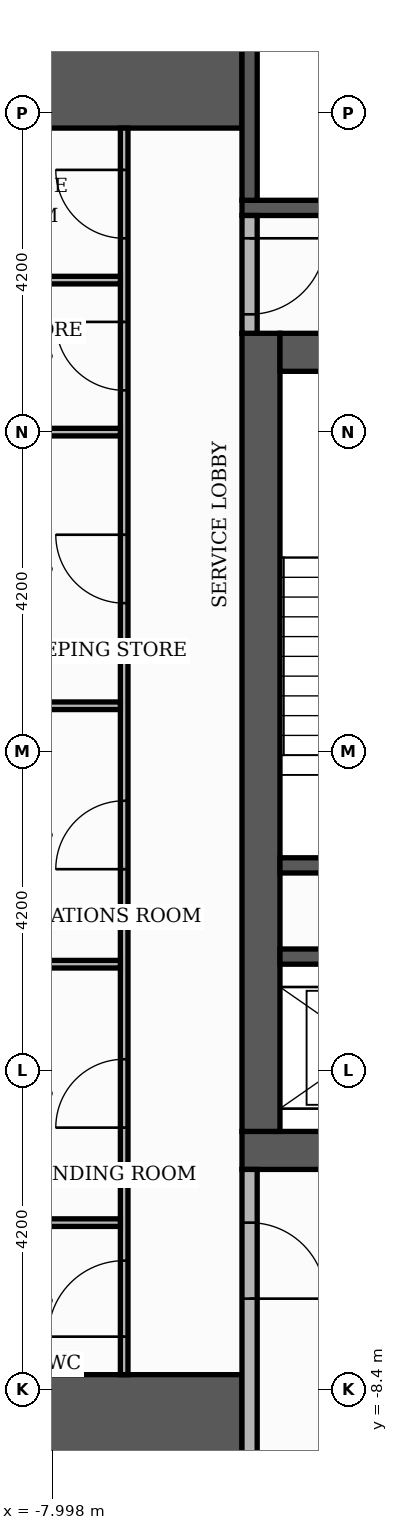
"""IFC4 building model, lengths in metres.
Left out: names, types, materials, properties, quantities, classifications, styles, units other than length and angle.
Written with IfcOpenShell. Run it as: python <this file> out.ifc"""

import sys

from ifc_helpers import new_model, si_unit, direction, frame, frame_2d, origin, place, context, subcontext, project, spatial, rectangle, extrude, element, fill, save


model = new_model("IFC4")
c1 = context("Model", 3, precision=1e-05, world=origin(), true_north=direction((0.0, 1.0)))
c2 = subcontext(c1, "Body", "Model", "MODEL_VIEW")
j1 = project(units=[si_unit("LENGTHUNIT", "METRE"), si_unit("PLANEANGLEUNIT", "RADIAN")], contexts=[c1])
p1 = place(None, origin())
s1 = spatial("IfcSite", under=j1, at=p1, CompositionType="ELEMENT")
p2 = place(p1, origin())
s2 = spatial("IfcBuilding", under=s1, at=p2, CompositionType="ELEMENT")
p3 = place(p2, frame((0.0, 0.0, 149.4)))
s3 = spatial("IfcBuildingStorey", under=s2, at=p3, CompositionType="ELEMENT", Elevation=149.4)
p4 = place(p3, frame((-5.5, -5.25, 0.0), z_axis=(0.0, 0.0, 1.0), x_axis=(1.0, 0.0, 0.0)))
e1 = element("IfcWall", 1, at=p4, inside=s3, PredefinedType="SHEAR", context=c2, shape_type="SweptSolid", body=[
    extrude(rectangle(XDim=11.0, YDim=0.5, at=frame_2d((5.5, 0.0))), origin(), (0.0, 0.0, 1.0), 3.48),
])
p5 = place(p4, frame((4.9, 0.0, 0.0)))
e2 = element("IfcOpeningElement", 2, at=p5, cuts=e1, PredefinedType="OPENING", context=c2, shape_type="SweptSolid", body=[
    extrude(rectangle(XDim=1.2, YDim=2.1, at=frame_2d((0.6, 1.05))), frame((0.0, 0.26, 0.0), z_axis=(0.0, -1.0, 0.0), x_axis=(1.0, 0.0, 0.0)), (0.0, 0.0, 1.0), 0.52),
])
p6 = place(p3, frame((-5.25, -5.0, 0.0), z_axis=(0.0, 0.0, 1.0), x_axis=(0.0, 1.0, 0.0)))
e3 = element("IfcWall", 3, at=p6, inside=s3, PredefinedType="SHEAR", context=c2, shape_type="SweptSolid", body=[
    extrude(rectangle(XDim=10.5, YDim=0.5, at=frame_2d((5.25, 0.0))), origin(), (0.0, 0.0, 1.0), 3.48),
])
p7 = place(p3, frame((-5.0, 5.25, 0.0), z_axis=(0.0, 0.0, 1.0), x_axis=(1.0, 0.0, 0.0)))
e4 = element("IfcWall", 4, at=p7, inside=s3, PredefinedType="SHEAR", context=c2, shape_type="SweptSolid", body=[
    extrude(rectangle(XDim=10.0, YDim=0.5, at=frame_2d((5.0, 0.0))), origin(), (0.0, 0.0, 1.0), 3.48),
])
p8 = place(p7, frame((4.4, 0.0, 0.0)))
e5 = element("IfcOpeningElement", 5, at=p8, cuts=e4, PredefinedType="OPENING", context=c2, shape_type="SweptSolid", body=[
    extrude(rectangle(XDim=1.2, YDim=2.1, at=frame_2d((0.6, 1.05))), frame((0.0, 0.26, 0.0), z_axis=(0.0, -1.0, 0.0), x_axis=(1.0, 0.0, 0.0)), (0.0, 0.0, 1.0), 0.52),
])
for number, where, z_axis, x_axis in (
    (6, (-10.1, -9.15, 0.0), (0.0, 0.0, 1.0), (1.0, 0.0, 0.0)),
    (7, (-10.1, 9.15, 0.0), (0.0, 0.0, 1.0), (1.0, 0.0, 0.0)),
):
    element("IfcWall", number, at=place(p3, frame(where, z_axis=z_axis, x_axis=x_axis)), inside=s3, PredefinedType="SHEAR", context=c2, shape_type="SweptSolid", body=[
        extrude(rectangle(XDim=4.6, YDim=1.9, at=frame_2d((2.3, 0.0))), origin(), (0.0, 0.0, 1.0), 3.48),
    ])
p9 = place(p3, frame((-5.0, -1.5, 0.0), z_axis=(0.0, 0.0, 1.0), x_axis=(1.0, 0.0, 0.0)))
e8 = element("IfcWall", 8, at=p9, inside=s3, PredefinedType="SHEAR", context=c2, shape_type="SweptSolid", body=[
    extrude(rectangle(XDim=3.05, YDim=0.2, at=frame_2d((1.525, 0.0))), origin(), (0.0, 0.0, 1.0), 3.48),
])
p10 = place(p3, frame((-5.5, 7.15, 0.0), z_axis=(0.0, 0.0, 1.0), x_axis=(1.0, 0.0, 0.0)))
e9 = element("IfcWall", 9, at=p10, inside=s3, PredefinedType="SHEAR", context=c2, shape_type="SweptSolid", body=[
    extrude(rectangle(XDim=6.8, YDim=0.2, at=frame_2d((3.4, 0.0))), origin(), (0.0, 0.0, 1.0), 3.48),
])
for number, where, z_axis, x_axis in (
    (10, (-5.4, 7.25, 0.0), (0.0, 0.0, 1.0), (0.0, 1.0, 0.0)),
    (11, (-5.0, -2.7, 0.0), (0.0, 0.0, 1.0), (1.0, 0.0, 0.0)),
):
    element("IfcWall", number, at=place(p3, frame(where, z_axis=z_axis, x_axis=x_axis)), inside=s3, PredefinedType="SHEAR", context=c2, shape_type="SweptSolid", body=[
        extrude(rectangle(XDim=2.85, YDim=0.2, at=frame_2d((1.425, 0.0))), origin(), (0.0, 0.0, 1.0), 3.48),
    ])
p11 = place(p3, frame((-5.4, -10.1, 0.0), z_axis=(0.0, 0.0, 1.0), x_axis=(0.0, 1.0, 0.0)))
e12 = element("IfcWall", 12, at=p11, inside=s3, PredefinedType="PARTITIONING", context=c2, shape_type="SweptSolid", body=[
    extrude(rectangle(XDim=4.6, YDim=0.2, at=frame_2d((2.3, 0.0))), origin(), (0.0, 0.0, 1.0), 3.48),
])
p12 = place(p11, frame((2.9, 0.0, 0.0)))
e13 = element("IfcOpeningElement", 13, at=p12, cuts=e12, PredefinedType="OPENING", context=c2, shape_type="SweptSolid", body=[
    extrude(rectangle(XDim=1.0, YDim=2.1, at=frame_2d((0.5, 1.05))), frame((0.0, 0.11, 0.0), z_axis=(0.0, -1.0, 0.0), x_axis=(1.0, 0.0, 0.0)), (0.0, 0.0, 1.0), 0.22),
])
p13 = place(p3, frame((-7.05, -8.2, 0.0), z_axis=(0.0, 0.0, 1.0), x_axis=(0.0, 1.0, 0.0)))
e14 = element("IfcWall", 14, at=p13, inside=s3, PredefinedType="PARTITIONING", context=c2, shape_type="SweptSolid", body=[
    extrude(rectangle(XDim=16.4, YDim=0.1, at=frame_2d((8.2, 0.0))), origin(), (0.0, 0.0, 1.0), 3.48),
])
p14 = place(p13, frame((0.5, 0.0, 0.0)))
e15 = element("IfcOpeningElement", 15, at=p14, cuts=e14, PredefinedType="OPENING", context=c2, shape_type="SweptSolid", body=[
    extrude(rectangle(XDim=1.0, YDim=2.1, at=frame_2d((0.5, 1.05))), frame((0.0, 0.06, 0.0), z_axis=(0.0, -1.0, 0.0), x_axis=(1.0, 0.0, 0.0)), (0.0, 0.0, 1.0), 0.12),
])
p15 = place(p13, frame((3.25, 0.0, 0.0)))
e16 = element("IfcOpeningElement", 16, at=p15, cuts=e14, PredefinedType="OPENING", context=c2, shape_type="SweptSolid", body=[
    extrude(rectangle(XDim=0.9, YDim=2.1, at=frame_2d((0.45, 1.05))), frame((0.0, 0.06, 0.0), z_axis=(0.0, -1.0, 0.0), x_axis=(1.0, 0.0, 0.0)), (0.0, 0.0, 1.0), 0.12),
])
p16 = place(p13, frame((6.65, 0.0, 0.0)))
e17 = element("IfcOpeningElement", 17, at=p16, cuts=e14, PredefinedType="OPENING", context=c2, shape_type="SweptSolid", body=[
    extrude(rectangle(XDim=0.9, YDim=2.1, at=frame_2d((0.45, 1.05))), frame((0.0, 0.06, 0.0), z_axis=(0.0, -1.0, 0.0), x_axis=(1.0, 0.0, 0.0)), (0.0, 0.0, 1.0), 0.12),
])
p17 = place(p13, frame((10.15, 0.0, 0.0)))
e18 = element("IfcOpeningElement", 18, at=p17, cuts=e14, PredefinedType="OPENING", context=c2, shape_type="SweptSolid", body=[
    extrude(rectangle(XDim=0.9, YDim=2.1, at=frame_2d((0.45, 1.05))), frame((0.0, 0.06, 0.0), z_axis=(0.0, -1.0, 0.0), x_axis=(1.0, 0.0, 0.0)), (0.0, 0.0, 1.0), 0.12),
])
p18 = place(p13, frame((12.95, 0.0, 0.0)))
e19 = element("IfcOpeningElement", 19, at=p18, cuts=e14, PredefinedType="OPENING", context=c2, shape_type="SweptSolid", body=[
    extrude(rectangle(XDim=0.9, YDim=2.1, at=frame_2d((0.45, 1.05))), frame((0.0, 0.06, 0.0), z_axis=(0.0, -1.0, 0.0), x_axis=(1.0, 0.0, 0.0)), (0.0, 0.0, 1.0), 0.12),
])
p19 = place(p13, frame((14.95, 0.0, 0.0)))
e20 = element("IfcOpeningElement", 20, at=p19, cuts=e14, PredefinedType="OPENING", context=c2, shape_type="SweptSolid", body=[
    extrude(rectangle(XDim=0.9, YDim=2.1, at=frame_2d((0.45, 1.05))), frame((0.0, 0.06, 0.0), z_axis=(0.0, -1.0, 0.0), x_axis=(1.0, 0.0, 0.0)), (0.0, 0.0, 1.0), 0.12),
])
for number, where, z_axis, x_axis in (
    (21, (-9.0, -6.2, 0.0), (0.0, 0.0, 1.0), (1.0, 0.0, 0.0)),
    (22, (-9.0, -2.8, 0.0), (0.0, 0.0, 1.0), (1.0, 0.0, 0.0)),
    (23, (-9.0, 0.6, 0.0), (0.0, 0.0, 1.0), (1.0, 0.0, 0.0)),
    (24, (-9.0, 4.2, 0.0), (0.0, 0.0, 1.0), (1.0, 0.0, 0.0)),
):
    element("IfcWall", number, at=place(p3, frame(where, z_axis=z_axis, x_axis=x_axis)), inside=s3, PredefinedType="PARTITIONING", context=c2, shape_type="SweptSolid", body=[
        extrude(rectangle(XDim=1.9, YDim=0.1, at=frame_2d((0.95, 0.0))), origin(), (0.0, 0.0, 1.0), 3.48),
    ])
p20 = place(p3, frame((-5.4, 5.5, 0.0), z_axis=(0.0, 0.0, 1.0), x_axis=(0.0, 1.0, 0.0)))
e25 = element("IfcWall", 25, at=p20, inside=s3, PredefinedType="PARTITIONING", context=c2, shape_type="SweptSolid", body=[
    extrude(rectangle(XDim=1.55, YDim=0.2, at=frame_2d((0.775, 0.0))), origin(), (0.0, 0.0, 1.0), 3.48),
])
p21 = place(p20, frame((0.25, 0.0, 0.0)))
e26 = element("IfcOpeningElement", 26, at=p21, cuts=e25, PredefinedType="OPENING", context=c2, shape_type="SweptSolid", body=[
    extrude(rectangle(XDim=1.0, YDim=2.1, at=frame_2d((0.5, 1.05))), frame((0.0, 0.11, 0.0), z_axis=(0.0, -1.0, 0.0), x_axis=(1.0, 0.0, 0.0)), (0.0, 0.0, 1.0), 0.22),
])
p22 = place(p3, frame((-9.0, 6.2, 0.0), z_axis=(0.0, 0.0, 1.0), x_axis=(1.0, 0.0, 0.0)))
e27 = element("IfcWall", 27, at=p22, inside=s3, PredefinedType="PARTITIONING", context=c2, shape_type="SweptSolid", body=[
    extrude(rectangle(XDim=1.9, YDim=0.1, at=frame_2d((0.95, 0.0))), origin(), (0.0, 0.0, 1.0), 3.48),
])
p23 = place(p21, frame((1.0, 0.0, 0.0), z_axis=(0.0, 0.0, 1.0), x_axis=(-1.0, 0.0, 0.0)))
e28 = element("IfcDoor", 28, at=p23, inside=s3, OperationType="SINGLE_SWING_RIGHT", PredefinedType="DOOR", context=c2, shape_type="SweptSolid", body=[
    extrude(rectangle(XDim=1.0, YDim=2.1, at=frame_2d((0.5, 1.05))), frame((0.0, 0.025, 0.0), z_axis=(0.0, -1.0, 0.0), x_axis=(1.0, 0.0, 0.0)), (0.0, 0.0, 1.0), 0.05),
])
fill(e26, e28)
p24 = place(p12, frame((1.0, 0.0, 0.0), z_axis=(0.0, 0.0, 1.0), x_axis=(-1.0, 0.0, 0.0)))
e29 = element("IfcDoor", 29, at=p24, inside=s3, OperationType="SINGLE_SWING_LEFT", PredefinedType="DOOR", context=c2, shape_type="SweptSolid", body=[
    extrude(rectangle(XDim=1.0, YDim=2.1, at=frame_2d((0.5, 1.05))), frame((0.0, 0.025, 0.0), z_axis=(0.0, -1.0, 0.0), x_axis=(1.0, 0.0, 0.0)), (0.0, 0.0, 1.0), 0.05),
])
fill(e13, e29)
p25 = place(p14, origin())
e30 = element("IfcDoor", 30, at=p25, inside=s3, OperationType="SINGLE_SWING_LEFT", PredefinedType="DOOR", context=c2, shape_type="SweptSolid", body=[
    extrude(rectangle(XDim=1.0, YDim=2.1, at=frame_2d((0.5, 1.05))), frame((0.0, 0.025, 0.0), z_axis=(0.0, -1.0, 0.0), x_axis=(1.0, 0.0, 0.0)), (0.0, 0.0, 1.0), 0.05),
])
fill(e15, e30)
p26 = place(p15, origin())
e31 = element("IfcDoor", 31, at=p26, inside=s3, OperationType="SINGLE_SWING_LEFT", PredefinedType="DOOR", context=c2, shape_type="SweptSolid", body=[
    extrude(rectangle(XDim=0.9, YDim=2.1, at=frame_2d((0.45, 1.05))), frame((0.0, 0.025, 0.0), z_axis=(0.0, -1.0, 0.0), x_axis=(1.0, 0.0, 0.0)), (0.0, 0.0, 1.0), 0.05),
])
fill(e16, e31)
p27 = place(p16, origin())
e32 = element("IfcDoor", 32, at=p27, inside=s3, OperationType="SINGLE_SWING_LEFT", PredefinedType="DOOR", context=c2, shape_type="SweptSolid", body=[
    extrude(rectangle(XDim=0.9, YDim=2.1, at=frame_2d((0.45, 1.05))), frame((0.0, 0.025, 0.0), z_axis=(0.0, -1.0, 0.0), x_axis=(1.0, 0.0, 0.0)), (0.0, 0.0, 1.0), 0.05),
])
fill(e17, e32)
p28 = place(p17, origin())
e33 = element("IfcDoor", 33, at=p28, inside=s3, OperationType="SINGLE_SWING_RIGHT", PredefinedType="DOOR", context=c2, shape_type="SweptSolid", body=[
    extrude(rectangle(XDim=0.9, YDim=2.1, at=frame_2d((0.45, 1.05))), frame((0.0, 0.025, 0.0), z_axis=(0.0, -1.0, 0.0), x_axis=(1.0, 0.0, 0.0)), (0.0, 0.0, 1.0), 0.05),
])
fill(e18, e33)
p29 = place(p18, origin())
e34 = element("IfcDoor", 34, at=p29, inside=s3, OperationType="SINGLE_SWING_RIGHT", PredefinedType="DOOR", context=c2, shape_type="SweptSolid", body=[
    extrude(rectangle(XDim=0.9, YDim=2.1, at=frame_2d((0.45, 1.05))), frame((0.0, 0.025, 0.0), z_axis=(0.0, -1.0, 0.0), x_axis=(1.0, 0.0, 0.0)), (0.0, 0.0, 1.0), 0.05),
])
fill(e19, e34)
p30 = place(p19, origin())
e35 = element("IfcDoor", 35, at=p30, inside=s3, OperationType="SINGLE_SWING_RIGHT", PredefinedType="DOOR", context=c2, shape_type="SweptSolid", body=[
    extrude(rectangle(XDim=0.9, YDim=2.1, at=frame_2d((0.45, 1.05))), frame((0.0, 0.025, 0.0), z_axis=(0.0, -1.0, 0.0), x_axis=(1.0, 0.0, 0.0)), (0.0, 0.0, 1.0), 0.05),
])
fill(e20, e35)
save(model, sys.argv[1])
